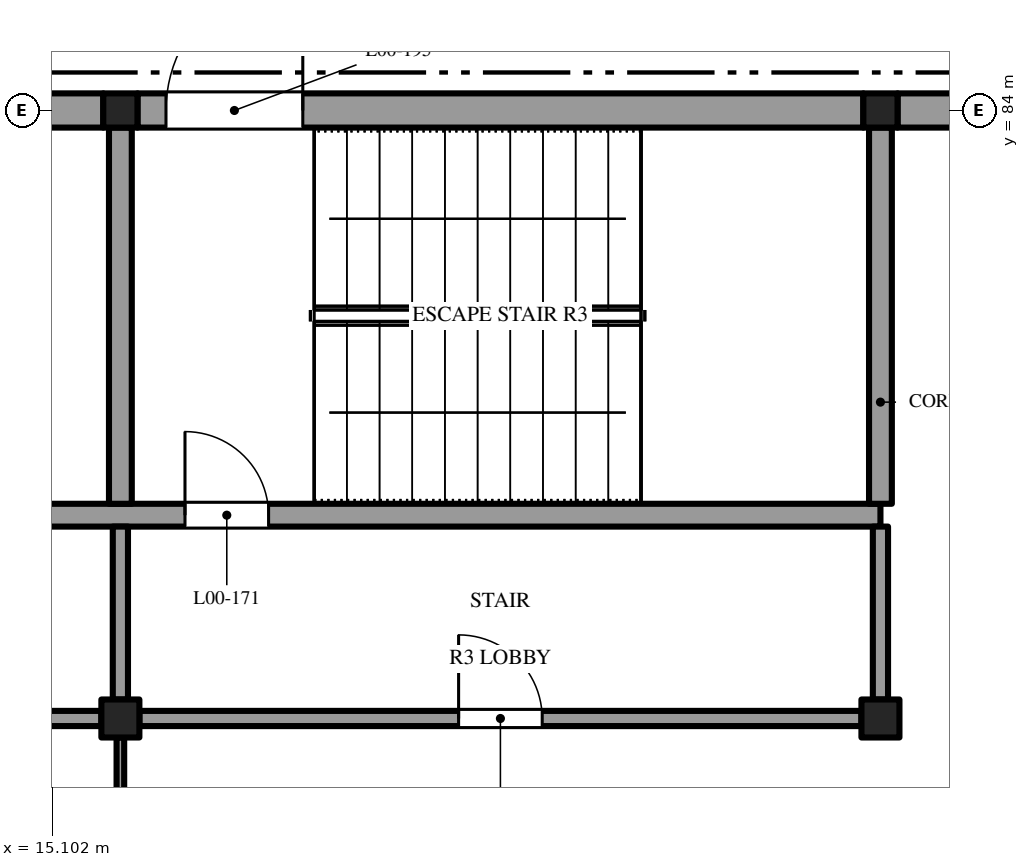
"""IFC4 building model, lengths in metres.
Left out: names, types, materials, properties, quantities, classifications, styles, units other than length and angle.
Written with IfcOpenShell. Run it as: python <this file> out.ifc"""

import sys

from ifc_helpers import new_model, si_unit, direction, frame, frame_2d, origin, origin_2d, place, context, subcontext, project, spatial, rectangle, extrude, element, fill, save


model = new_model("IFC4")
c1 = context("Model", 3, precision=1e-05, world=origin(), true_north=direction((0.0, 1.0)))
c2 = subcontext(c1, "Body", "Model", "MODEL_VIEW")
j1 = project(units=[si_unit("LENGTHUNIT", "METRE"), si_unit("PLANEANGLEUNIT", "RADIAN")], contexts=[c1])
p1 = place(None, origin())
s1 = spatial("IfcSite", under=j1, at=p1, CompositionType="ELEMENT")
p2 = place(p1, origin())
s2 = spatial("IfcBuilding", under=s1, at=p2, CompositionType="ELEMENT")
p3 = place(p2, origin())
s3 = spatial("IfcBuildingStorey", under=s2, at=p3, CompositionType="ELEMENT", Elevation=0.0)
p4 = place(p3, frame((16.0, 76.0, -0.4), z_axis=(0.0, 0.0, 1.0), x_axis=(1.0, 0.0, 0.0)))
e1 = element("IfcColumn", 1, at=p4, inside=s3, PredefinedType="COLUMN", context=c2, shape_type="SweptSolid", body=[
    extrude(rectangle(XDim=0.5, YDim=0.5, at=origin_2d()), origin(), (0.0, 0.0, 1.0), 7.6),
])
p5 = place(p3, frame((16.0, 84.0, -0.4), z_axis=(0.0, 0.0, 1.0), x_axis=(1.0, 0.0, 0.0)))
e2 = element("IfcColumn", 2, at=p5, inside=s3, PredefinedType="COLUMN", context=c2, shape_type="SweptSolid", body=[
    extrude(rectangle(XDim=0.45, YDim=0.45, at=origin_2d()), origin(), (0.0, 0.0, 1.0), 7.6),
])
p6 = place(p3, frame((26.0, 76.0, -0.4), z_axis=(0.0, 0.0, 1.0), x_axis=(1.0, 0.0, 0.0)))
e3 = element("IfcColumn", 3, at=p6, inside=s3, PredefinedType="COLUMN", context=c2, shape_type="SweptSolid", body=[
    extrude(rectangle(XDim=0.5, YDim=0.5, at=origin_2d()), origin(), (0.0, 0.0, 1.0), 7.6),
])
p7 = place(p3, frame((26.0, 84.0, -0.4), z_axis=(0.0, 0.0, 1.0), x_axis=(1.0, 0.0, 0.0)))
e4 = element("IfcColumn", 4, at=p7, inside=s3, PredefinedType="COLUMN", context=c2, shape_type="SweptSolid", body=[
    extrude(rectangle(XDim=0.45, YDim=0.45, at=origin_2d()), origin(), (0.0, 0.0, 1.0), 7.6),
])
p8 = place(p3, frame((6.225, 76.0, 0.0), z_axis=(0.0, 0.0, 1.0), x_axis=(1.0, 0.0, 0.0)))
e5 = element("IfcWall", 5, at=p8, inside=s3, PredefinedType="SOLIDWALL", context=c2, shape_type="SweptSolid", body=[
    extrude(rectangle(XDim=9.525, YDim=0.2, at=frame_2d((4.762, 0.0))), origin(), (0.0, 0.0, 1.0), 6.85),
])
p9 = place(p8, frame((7.325, 0.0, 0.0)))
e6 = element("IfcOpeningElement", 6, at=p9, cuts=e5, PredefinedType="OPENING", context=c2, shape_type="SweptSolid", body=[
    extrude(rectangle(XDim=1.1, YDim=2.1, at=frame_2d((0.55, 1.05))), frame((0.0, 0.11, 0.0), z_axis=(0.0, -1.0, 0.0), x_axis=(1.0, 0.0, 0.0)), (0.0, 0.0, 1.0), 0.22),
])
p10 = place(p3, frame((16.25, 76.0, 0.0), z_axis=(0.0, 0.0, 1.0), x_axis=(1.0, 0.0, 0.0)))
e7 = element("IfcWall", 7, at=p10, inside=s3, PredefinedType="SOLIDWALL", context=c2, shape_type="SweptSolid", body=[
    extrude(rectangle(XDim=9.5, YDim=0.2, at=frame_2d((4.75, 0.0))), origin(), (0.0, 0.0, 1.0), 6.85),
])
p11 = place(p10, frame((4.2, 0.0, 0.0)))
e8 = element("IfcOpeningElement", 8, at=p11, cuts=e7, PredefinedType="OPENING", context=c2, shape_type="SweptSolid", body=[
    extrude(rectangle(XDim=1.1, YDim=2.1, at=frame_2d((0.55, 1.05))), frame((0.0, 0.11, 0.0), z_axis=(0.0, -1.0, 0.0), x_axis=(1.0, 0.0, 0.0)), (0.0, 0.0, 1.0), 0.22),
])
p12 = place(p3, frame((6.225, 78.675, 0.0), z_axis=(0.0, 0.0, 1.0), x_axis=(1.0, 0.0, 0.0)))
e9 = element("IfcWall", 9, at=p12, inside=s3, PredefinedType="SHEAR", context=c2, shape_type="SweptSolid", body=[
    extrude(rectangle(XDim=19.775, YDim=0.3, at=frame_2d((9.887, 0.0))), origin(), (0.0, 0.0, 1.0), 6.85),
])
p13 = place(p12, frame((0.625, 0.0, 0.0)))
e10 = element("IfcOpeningElement", 10, at=p13, cuts=e9, PredefinedType="OPENING", context=c2, shape_type="SweptSolid", body=[
    extrude(rectangle(XDim=1.1, YDim=2.1, at=frame_2d((0.55, 1.05))), frame((0.0, 0.16, 0.0), z_axis=(0.0, -1.0, 0.0), x_axis=(1.0, 0.0, 0.0)), (0.0, 0.0, 1.0), 0.32),
])
p14 = place(p12, frame((10.625, 0.0, 0.0)))
e11 = element("IfcOpeningElement", 11, at=p14, cuts=e9, PredefinedType="OPENING", context=c2, shape_type="SweptSolid", body=[
    extrude(rectangle(XDim=1.1, YDim=2.1, at=frame_2d((0.55, 1.05))), frame((0.0, 0.16, 0.0), z_axis=(0.0, -1.0, 0.0), x_axis=(1.0, 0.0, 0.0)), (0.0, 0.0, 1.0), 0.32),
])
p15 = place(p3, frame((15.775, 84.0, 0.0), z_axis=(0.0, 0.0, 1.0), x_axis=(-1.0, 0.0, 0.0)))
e12 = element("IfcWall", 12, at=p15, inside=s3, PredefinedType="SOLIDWALL", context=c2, shape_type="SweptSolid", body=[
    extrude(rectangle(XDim=9.55, YDim=0.45, at=frame_2d((4.775, 0.0))), origin(), (0.0, 0.0, 1.0), 6.85),
])
p16 = place(p15, frame((7.075, 0.0, 0.0)))
e13 = element("IfcOpeningElement", 13, at=p16, cuts=e12, PredefinedType="OPENING", context=c2, shape_type="SweptSolid", body=[
    extrude(rectangle(XDim=1.8, YDim=2.1, at=frame_2d((0.9, 1.05))), frame((0.0, 0.235, 0.0), z_axis=(0.0, -1.0, 0.0), x_axis=(1.0, 0.0, 0.0)), (0.0, 0.0, 1.0), 0.47),
])
p17 = place(p3, frame((25.775, 84.0, 0.0), z_axis=(0.0, 0.0, 1.0), x_axis=(-1.0, 0.0, 0.0)))
e14 = element("IfcWall", 14, at=p17, inside=s3, PredefinedType="SOLIDWALL", context=c2, shape_type="SweptSolid", body=[
    extrude(rectangle(XDim=9.55, YDim=0.45, at=frame_2d((4.775, 0.0))), origin(), (0.0, 0.0, 1.0), 6.85),
])
p18 = place(p17, frame((7.375, 0.0, 0.0)))
e15 = element("IfcOpeningElement", 15, at=p18, cuts=e14, PredefinedType="OPENING", context=c2, shape_type="SweptSolid", body=[
    extrude(rectangle(XDim=1.8, YDim=2.1, at=frame_2d((0.9, 1.05))), frame((0.0, 0.235, 0.0), z_axis=(0.0, -1.0, 0.0), x_axis=(1.0, 0.0, 0.0)), (0.0, 0.0, 1.0), 0.47),
])
p19 = place(p3, frame((35.775, 84.0, 0.0), z_axis=(0.0, 0.0, 1.0), x_axis=(-1.0, 0.0, 0.0)))
e16 = element("IfcWall", 16, at=p19, inside=s3, PredefinedType="SOLIDWALL", context=c2, shape_type="SweptSolid", body=[
    extrude(rectangle(XDim=9.55, YDim=0.45, at=frame_2d((4.775, 0.0))), origin(), (0.0, 0.0, 1.0), 6.85),
])
p20 = place(p19, frame((5.775, 0.0, 1.0)))
e17 = element("IfcOpeningElement", 17, at=p20, cuts=e16, PredefinedType="OPENING", context=c2, shape_type="SweptSolid", body=[
    extrude(rectangle(XDim=3.0, YDim=4.0, at=frame_2d((1.5, 2.0))), frame((0.0, 0.235, 0.0), z_axis=(0.0, -1.0, 0.0), x_axis=(1.0, 0.0, 0.0)), (0.0, 0.0, 1.0), 0.47),
])
p21 = place(p19, frame((0.775, 0.0, 1.0)))
e18 = element("IfcOpeningElement", 18, at=p21, cuts=e16, PredefinedType="OPENING", context=c2, shape_type="SweptSolid", body=[
    extrude(rectangle(XDim=3.0, YDim=4.0, at=frame_2d((1.5, 2.0))), frame((0.0, 0.235, 0.0), z_axis=(0.0, -1.0, 0.0), x_axis=(1.0, 0.0, 0.0)), (0.0, 0.0, 1.0), 0.47),
])
p22 = place(p3, frame((16.0, 68.25, 0.0), z_axis=(0.0, 0.0, 1.0), x_axis=(0.0, 1.0, 0.0)))
e19 = element("IfcWall", 19, at=p22, inside=s3, PredefinedType="PARTITIONING", context=c2, shape_type="SweptSolid", body=[
    extrude(rectangle(XDim=7.5, YDim=0.1, at=frame_2d((3.75, 0.0))), origin(), (0.0, 0.0, 1.0), 6.85),
])
p23 = place(p22, frame((4.85, 0.0, 0.0)))
e20 = element("IfcOpeningElement", 20, at=p23, cuts=e19, PredefinedType="OPENING", context=c2, shape_type="SweptSolid", body=[
    extrude(rectangle(XDim=1.8, YDim=2.1, at=frame_2d((0.9, 1.05))), frame((0.0, 0.06, 0.0), z_axis=(0.0, -1.0, 0.0), x_axis=(1.0, 0.0, 0.0)), (0.0, 0.0, 1.0), 0.12),
])
p24 = place(p3, frame((16.0, 76.25, 0.0), z_axis=(0.0, 0.0, 1.0), x_axis=(0.0, 1.0, 0.0)))
e21 = element("IfcWall", 21, at=p24, inside=s3, PredefinedType="SOLIDWALL", context=c2, shape_type="SweptSolid", body=[
    extrude(rectangle(XDim=2.275, YDim=0.2, at=frame_2d((1.137, 0.0))), origin(), (0.0, 0.0, 1.0), 6.85),
])
p25 = place(p3, frame((16.0, 78.825, 0.0), z_axis=(0.0, 0.0, 1.0), x_axis=(0.0, 1.0, 0.0)))
e22 = element("IfcWall", 22, at=p25, inside=s3, PredefinedType="SHEAR", context=c2, shape_type="SweptSolid", body=[
    extrude(rectangle(XDim=4.95, YDim=0.3, at=frame_2d((2.475, 0.0))), origin(), (0.0, 0.0, 1.0), 6.85),
])
p26 = place(p3, frame((26.0, 76.25, 0.0), z_axis=(0.0, 0.0, 1.0), x_axis=(0.0, 1.0, 0.0)))
e23 = element("IfcWall", 23, at=p26, inside=s3, PredefinedType="SOLIDWALL", context=c2, shape_type="SweptSolid", body=[
    extrude(rectangle(XDim=2.275, YDim=0.2, at=frame_2d((1.137, 0.0))), origin(), (0.0, 0.0, 1.0), 6.85),
])
p27 = place(p3, frame((26.0, 78.825, 0.0), z_axis=(0.0, 0.0, 1.0), x_axis=(0.0, 1.0, 0.0)))
e24 = element("IfcWall", 24, at=p27, inside=s3, PredefinedType="SHEAR", context=c2, shape_type="SweptSolid", body=[
    extrude(rectangle(XDim=4.95, YDim=0.3, at=frame_2d((2.475, 0.0))), origin(), (0.0, 0.0, 1.0), 6.85),
])
p28 = place(p11, origin())
e25 = element("IfcDoor", 25, at=p28, inside=s3, OperationType="SINGLE_SWING_LEFT", PredefinedType="DOOR", context=c2, shape_type="SweptSolid", body=[
    extrude(rectangle(XDim=1.1, YDim=2.1, at=frame_2d((0.55, 1.05))), frame((0.0, 0.025, 0.0), z_axis=(0.0, -1.0, 0.0), x_axis=(1.0, 0.0, 0.0)), (0.0, 0.0, 1.0), 0.05),
])
fill(e8, e25)
p29 = place(p14, origin())
e26 = element("IfcDoor", 26, at=p29, inside=s3, OperationType="SINGLE_SWING_RIGHT", PredefinedType="DOOR", context=c2, shape_type="SweptSolid", body=[
    extrude(rectangle(XDim=1.1, YDim=2.1, at=frame_2d((0.55, 1.05))), frame((0.0, 0.025, 0.0), z_axis=(0.0, -1.0, 0.0), x_axis=(1.0, 0.0, 0.0)), (0.0, 0.0, 1.0), 0.05),
])
fill(e11, e26)
p30 = place(p18, frame((1.8, 0.0, 0.0), z_axis=(0.0, 0.0, 1.0), x_axis=(-1.0, 0.0, 0.0)))
e27 = element("IfcDoor", 27, at=p30, inside=s3, OperationType="DOUBLE_DOOR_SINGLE_SWING", PredefinedType="DOOR", context=c2, shape_type="SweptSolid", body=[
    extrude(rectangle(XDim=1.8, YDim=2.1, at=frame_2d((0.9, 1.05))), frame((0.0, 0.025, 0.0), z_axis=(0.0, -1.0, 0.0), x_axis=(1.0, 0.0, 0.0)), (0.0, 0.0, 1.0), 0.05),
])
fill(e15, e27)
save(model, sys.argv[1])
